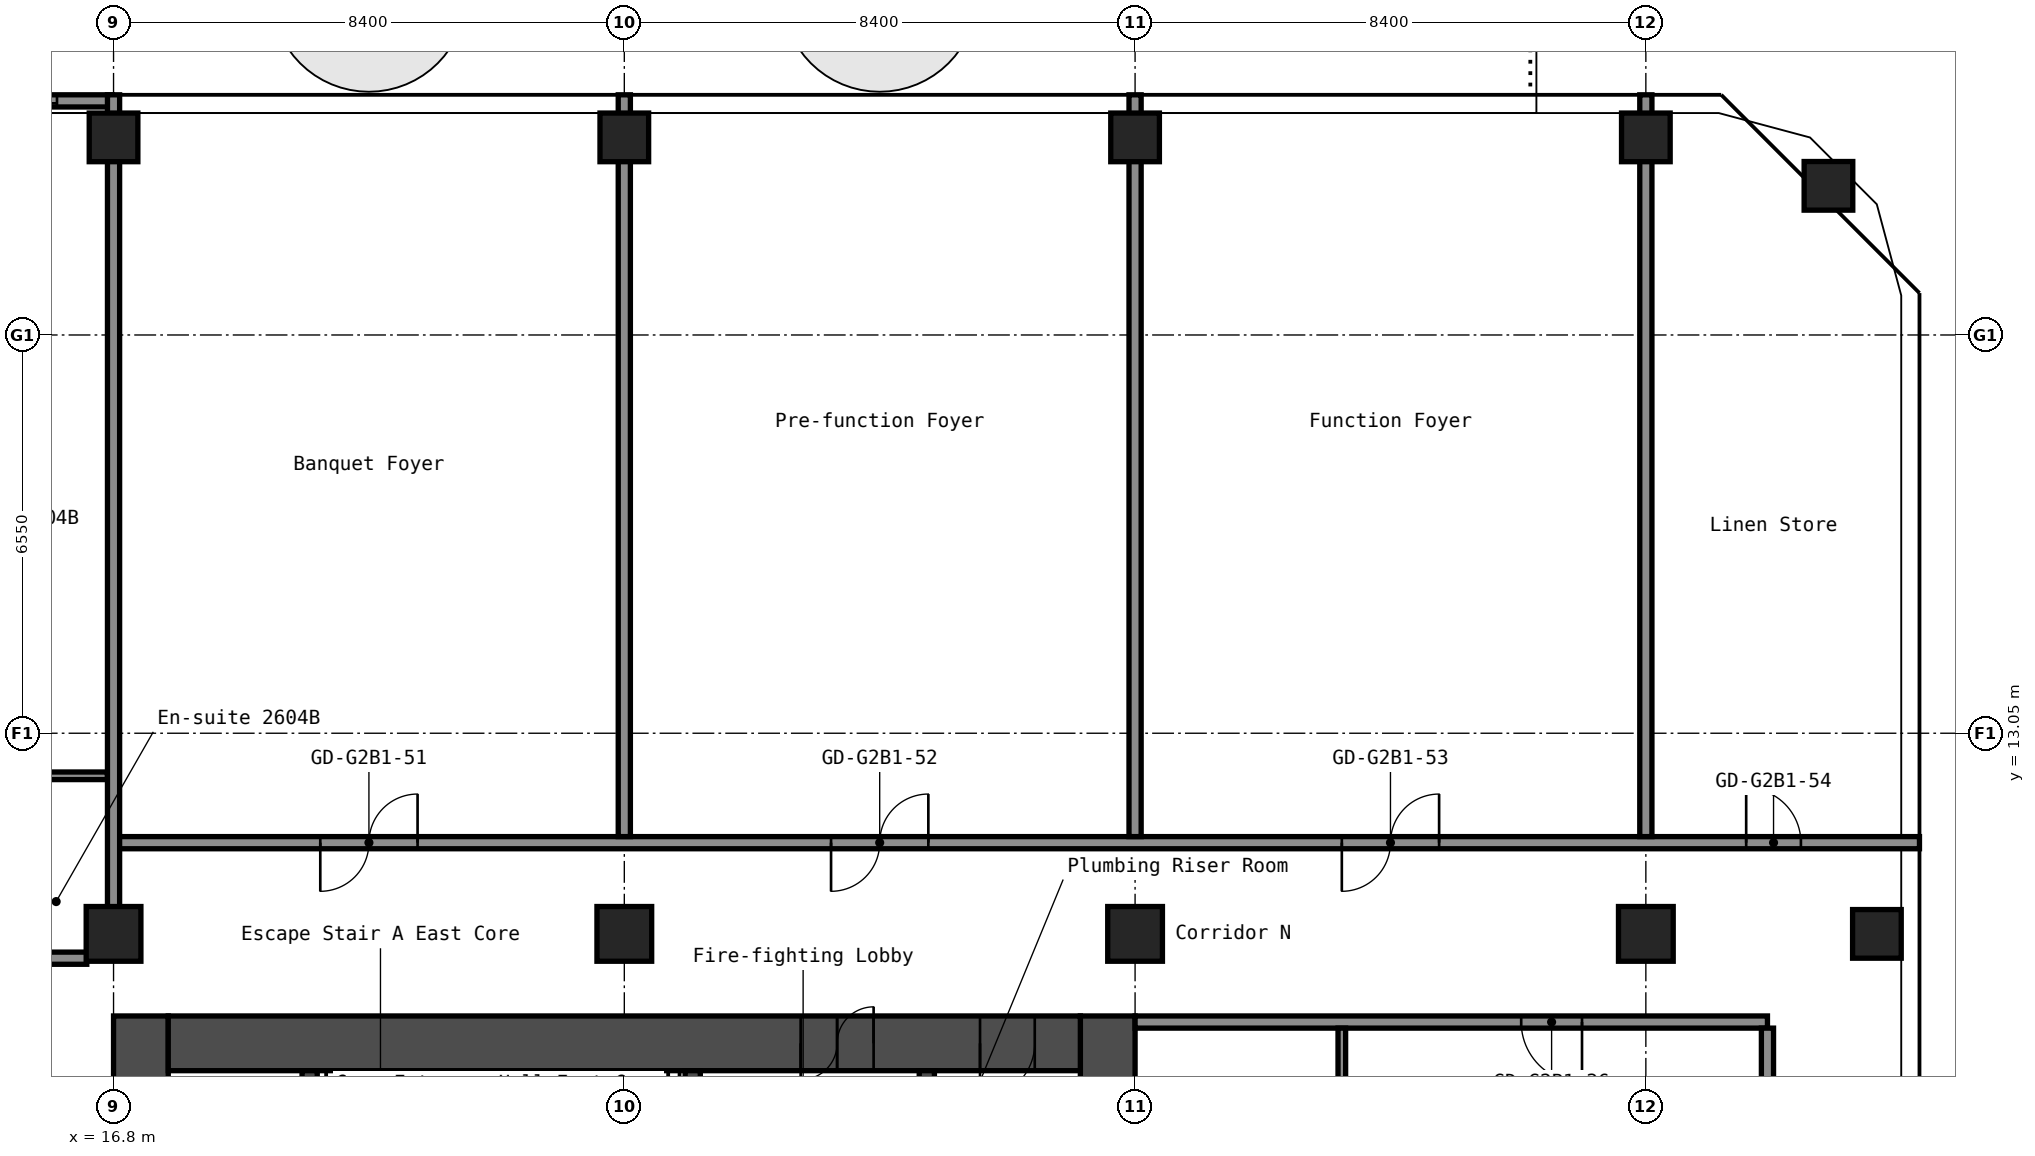
"""IFC4 building model, lengths in metres.
Left out: names, types, materials, properties, quantities, classifications, styles, units other than length and angle.
Written with IfcOpenShell. Run it as: python <this file> out.ifc"""

import sys

from ifc_helpers import new_model, si_unit, direction, frame, frame_2d, origin, origin_2d, place, context, subcontext, project, spatial, rectangle, hollow_rectangle, extrude, element, fill, save


model = new_model("IFC4")
c1 = context("Model", 3, precision=1e-05, world=origin(), true_north=direction((0.0, 1.0)))
c2 = subcontext(c1, "Body", "Model", "MODEL_VIEW")
j1 = project(units=[si_unit("LENGTHUNIT", "METRE"), si_unit("PLANEANGLEUNIT", "RADIAN")], contexts=[c1])
p1 = place(None, origin())
s1 = spatial("IfcSite", under=j1, at=p1, CompositionType="ELEMENT")
p2 = place(p1, origin())
s2 = spatial("IfcBuilding", under=s1, at=p2, CompositionType="ELEMENT")
p3 = place(p2, frame((0.0, 0.0, 94.6)))
s3 = spatial("IfcBuildingStorey", under=s2, at=p3, CompositionType="ELEMENT", Elevation=94.6)
p4 = place(p3, frame((16.8, 9.75, 0.0), z_axis=(0.0, 0.0, 1.0), x_axis=(1.0, 0.0, 0.0)))
e1 = element("IfcColumn", 1, at=p4, inside=s3, PredefinedType="COLUMN", context=c2, shape_type="SweptSolid", body=[
    extrude(hollow_rectangle(XDim=0.9, YDim=0.9, WallThickness=0.036, at=origin_2d()), origin(), (0.0, 0.0, 1.0), 2.8),
])
p5 = place(p3, frame((16.8, 22.85, 0.0), z_axis=(0.0, 0.0, 1.0), x_axis=(1.0, 0.0, 0.0)))
e2 = element("IfcColumn", 2, at=p5, inside=s3, PredefinedType="COLUMN", context=c2, shape_type="SweptSolid", body=[
    extrude(hollow_rectangle(XDim=0.8, YDim=0.8, WallThickness=0.032, at=origin_2d()), origin(), (0.0, 0.0, 1.0), 2.8),
])
p6 = place(p3, frame((25.2, 9.75, 0.0), z_axis=(0.0, 0.0, 1.0), x_axis=(1.0, 0.0, 0.0)))
e3 = element("IfcColumn", 3, at=p6, inside=s3, PredefinedType="COLUMN", context=c2, shape_type="SweptSolid", body=[
    extrude(hollow_rectangle(XDim=0.9, YDim=0.9, WallThickness=0.036, at=origin_2d()), origin(), (0.0, 0.0, 1.0), 2.8),
])
p7 = place(p3, frame((25.2, 22.85, 0.0), z_axis=(0.0, 0.0, 1.0), x_axis=(1.0, 0.0, 0.0)))
e4 = element("IfcColumn", 4, at=p7, inside=s3, PredefinedType="COLUMN", context=c2, shape_type="SweptSolid", body=[
    extrude(hollow_rectangle(XDim=0.8, YDim=0.8, WallThickness=0.032, at=origin_2d()), origin(), (0.0, 0.0, 1.0), 2.8),
])
p8 = place(p3, frame((33.6, 9.75, 0.0), z_axis=(0.0, 0.0, 1.0), x_axis=(1.0, 0.0, 0.0)))
e5 = element("IfcColumn", 5, at=p8, inside=s3, PredefinedType="COLUMN", context=c2, shape_type="SweptSolid", body=[
    extrude(hollow_rectangle(XDim=0.9, YDim=0.9, WallThickness=0.036, at=origin_2d()), origin(), (0.0, 0.0, 1.0), 2.8),
])
p9 = place(p3, frame((33.6, 22.85, 0.0), z_axis=(0.0, 0.0, 1.0), x_axis=(1.0, 0.0, 0.0)))
e6 = element("IfcColumn", 6, at=p9, inside=s3, PredefinedType="COLUMN", context=c2, shape_type="SweptSolid", body=[
    extrude(hollow_rectangle(XDim=0.8, YDim=0.8, WallThickness=0.032, at=origin_2d()), origin(), (0.0, 0.0, 1.0), 2.8),
])
p10 = place(p3, frame((42.0, 9.75, 0.0), z_axis=(0.0, 0.0, 1.0), x_axis=(1.0, 0.0, 0.0)))
e7 = element("IfcColumn", 7, at=p10, inside=s3, PredefinedType="COLUMN", context=c2, shape_type="SweptSolid", body=[
    extrude(hollow_rectangle(XDim=0.9, YDim=0.9, WallThickness=0.036, at=origin_2d()), origin(), (0.0, 0.0, 1.0), 2.8),
])
for number, where, z_axis, x_axis in (
    (8, (42.0, 22.85, 0.0), (0.0, 0.0, 1.0), (1.0, 0.0, 0.0)),
    (9, (45.8, 9.75, 0.0), (0.0, 0.0, 1.0), (1.0, 0.0, 0.0)),
    (10, (45.003, 22.053, 0.0), (0.0, 0.0, 1.0), (1.0, 0.0, 0.0)),
):
    element("IfcColumn", number, at=place(p3, frame(where, z_axis=z_axis, x_axis=x_axis)), inside=s3, PredefinedType="COLUMN", context=c2, shape_type="SweptSolid", body=[
        extrude(hollow_rectangle(XDim=0.8, YDim=0.8, WallThickness=0.032, at=origin_2d()), origin(), (0.0, 0.0, 1.0), 2.8),
    ])
p11 = place(p3, frame((17.25, -8.4, 0.0), z_axis=(0.0, 0.0, 1.0), x_axis=(0.0, 1.0, 0.0)))
e11 = element("IfcWall", 11, at=p11, inside=s3, PredefinedType="SHEAR", context=c2, shape_type="SweptSolid", body=[
    extrude(rectangle(XDim=16.8, YDim=0.9, at=frame_2d((8.4, 0.0))), origin(), (0.0, 0.0, 1.0), 2.8),
])
p12 = place(p11, frame((7.6, 0.0, 0.0)))
e12 = element("IfcOpeningElement", 12, at=p12, cuts=e11, PredefinedType="OPENING", context=c2, shape_type="SweptSolid", body=[
    extrude(rectangle(XDim=1.2, YDim=2.1, at=frame_2d((0.6, 1.05))), frame((0.0, 0.46, 0.0), z_axis=(0.0, -1.0, 0.0), x_axis=(1.0, 0.0, 0.0)), (0.0, 0.0, 1.0), 0.92),
])
p13 = place(p3, frame((33.15, -8.4, 0.0), z_axis=(0.0, 0.0, 1.0), x_axis=(0.0, 1.0, 0.0)))
e13 = element("IfcWall", 13, at=p13, inside=s3, PredefinedType="SHEAR", context=c2, shape_type="SweptSolid", body=[
    extrude(rectangle(XDim=16.8, YDim=0.9, at=frame_2d((8.4, 0.0))), origin(), (0.0, 0.0, 1.0), 2.8),
])
p14 = place(p3, frame((17.7, 7.95, 0.0), z_axis=(0.0, 0.0, 1.0), x_axis=(1.0, 0.0, 0.0)))
e14 = element("IfcWall", 14, at=p14, inside=s3, PredefinedType="SHEAR", context=c2, shape_type="SweptSolid", body=[
    extrude(rectangle(XDim=15.0, YDim=0.9, at=frame_2d((7.5, 0.0))), origin(), (0.0, 0.0, 1.0), 2.8),
])
p15 = place(p14, frame((10.4, 0.0, 0.0)))
e15 = element("IfcOpeningElement", 15, at=p15, cuts=e14, PredefinedType="OPENING", context=c2, shape_type="SweptSolid", body=[
    extrude(rectangle(XDim=1.2, YDim=2.1, at=frame_2d((0.6, 1.05))), frame((0.0, 0.46, 0.0), z_axis=(0.0, -1.0, 0.0), x_axis=(1.0, 0.0, 0.0)), (0.0, 0.0, 1.0), 0.92),
])
p16 = place(p14, frame((13.35, 0.0, 0.0)))
e16 = element("IfcOpeningElement", 16, at=p16, cuts=e14, PredefinedType="OPENING", context=c2, shape_type="SweptSolid", body=[
    extrude(rectangle(XDim=0.9, YDim=2.1, at=frame_2d((0.45, 1.05))), frame((0.0, 0.46, 0.0), z_axis=(0.0, -1.0, 0.0), x_axis=(1.0, 0.0, 0.0)), (0.0, 0.0, 1.0), 0.92),
])
p17 = place(p3, frame((20.025, 1.2, 0.0), z_axis=(0.0, 0.0, 1.0), x_axis=(0.0, 1.0, 0.0)))
e17 = element("IfcWall", 17, at=p17, inside=s3, PredefinedType="SHEAR", context=c2, shape_type="SweptSolid", body=[
    extrude(rectangle(XDim=6.3, YDim=0.25, at=frame_2d((3.15, 0.0))), origin(), (0.0, 0.0, 1.0), 2.8),
])
p18 = place(p3, frame((26.325, 3.75, 0.0), z_axis=(0.0, 0.0, 1.0), x_axis=(0.0, 1.0, 0.0)))
e18 = element("IfcWall", 18, at=p18, inside=s3, PredefinedType="SHEAR", context=c2, shape_type="SweptSolid", body=[
    extrude(rectangle(XDim=3.75, YDim=0.25, at=frame_2d((1.875, 0.0))), origin(), (0.0, 0.0, 1.0), 2.8),
])
p19 = place(p18, frame((1.25, 0.0, 0.0)))
e19 = element("IfcOpeningElement", 19, at=p19, cuts=e18, PredefinedType="OPENING", context=c2, shape_type="SweptSolid", body=[
    extrude(rectangle(XDim=1.2, YDim=2.1, at=frame_2d((0.6, 1.05))), frame((0.0, 0.135, 0.0), z_axis=(0.0, -1.0, 0.0), x_axis=(1.0, 0.0, 0.0)), (0.0, 0.0, 1.0), 0.27),
])
p20 = place(p3, frame((30.175, 1.45, 0.0), z_axis=(0.0, 0.0, 1.0), x_axis=(0.0, 1.0, 0.0)))
e20 = element("IfcWall", 20, at=p20, inside=s3, PredefinedType="SHEAR", context=c2, shape_type="SweptSolid", body=[
    extrude(rectangle(XDim=6.05, YDim=0.25, at=frame_2d((3.025, 0.0))), origin(), (0.0, 0.0, 1.0), 2.8),
])
p21 = place(p20, frame((2.625, 0.0, 0.0)))
e21 = element("IfcOpeningElement", 21, at=p21, cuts=e20, PredefinedType="OPENING", context=c2, shape_type="SweptSolid", body=[
    extrude(rectangle(XDim=1.1, YDim=2.1, at=frame_2d((0.55, 1.05))), frame((0.0, 0.135, 0.0), z_axis=(0.0, -1.0, 0.0), x_axis=(1.0, 0.0, 0.0)), (0.0, 0.0, 1.0), 0.27),
])
p22 = place(p3, frame((33.6, 8.3, 0.0), z_axis=(0.0, 0.0, 1.0), x_axis=(1.0, 0.0, 0.0)))
e22 = element("IfcWall", 22, at=p22, inside=s3, PredefinedType="PARTITIONING", context=c2, shape_type="SweptSolid", body=[
    extrude(rectangle(XDim=10.4, YDim=0.2, at=frame_2d((5.2, 0.0))), origin(), (0.0, 0.0, 1.0), 2.8),
])
p23 = place(p22, frame((6.35, 0.0, 0.0)))
e23 = element("IfcOpeningElement", 23, at=p23, cuts=e22, PredefinedType="OPENING", context=c2, shape_type="SweptSolid", body=[
    extrude(rectangle(XDim=1.0, YDim=2.1, at=frame_2d((0.5, 1.05))), frame((0.0, 0.11, 0.0), z_axis=(0.0, -1.0, 0.0), x_axis=(1.0, 0.0, 0.0)), (0.0, 0.0, 1.0), 0.22),
])
p24 = place(p3, frame((-16.36, 9.35, 0.0), z_axis=(0.0, 0.0, 1.0), x_axis=(1.0, 0.0, 0.0)))
e24 = element("IfcWall", 24, at=p24, inside=s3, PredefinedType="PARTITIONING", context=c2, shape_type="SweptSolid", body=[
    extrude(rectangle(XDim=32.72, YDim=0.2, at=frame_2d((16.36, 0.0))), origin(), (0.0, 0.0, 1.0), 2.8),
])
p25 = place(p24, frame((1.8, 0.0, 0.0)))
e25 = element("IfcOpeningElement", 25, at=p25, cuts=e24, PredefinedType="OPENING", context=c2, shape_type="SweptSolid", body=[
    extrude(rectangle(XDim=0.9, YDim=2.1, at=frame_2d((0.45, 1.05))), frame((0.0, 0.11, 0.0), z_axis=(0.0, -1.0, 0.0), x_axis=(1.0, 0.0, 0.0)), (0.0, 0.0, 1.0), 0.22),
])
p26 = place(p24, frame((6.0, 0.0, 0.0)))
e26 = element("IfcOpeningElement", 26, at=p26, cuts=e24, PredefinedType="OPENING", context=c2, shape_type="SweptSolid", body=[
    extrude(rectangle(XDim=0.9, YDim=2.1, at=frame_2d((0.45, 1.05))), frame((0.0, 0.11, 0.0), z_axis=(0.0, -1.0, 0.0), x_axis=(1.0, 0.0, 0.0)), (0.0, 0.0, 1.0), 0.22),
])
p27 = place(p24, frame((9.275, 0.0, 0.0)))
e27 = element("IfcOpeningElement", 27, at=p27, cuts=e24, PredefinedType="OPENING", context=c2, shape_type="SweptSolid", body=[
    extrude(rectangle(XDim=0.9, YDim=2.1, at=frame_2d((0.45, 1.05))), frame((0.0, 0.11, 0.0), z_axis=(0.0, -1.0, 0.0), x_axis=(1.0, 0.0, 0.0)), (0.0, 0.0, 1.0), 0.22),
])
p28 = place(p24, frame((13.475, 0.0, 0.0)))
e28 = element("IfcOpeningElement", 28, at=p28, cuts=e24, PredefinedType="OPENING", context=c2, shape_type="SweptSolid", body=[
    extrude(rectangle(XDim=0.9, YDim=2.1, at=frame_2d((0.45, 1.05))), frame((0.0, 0.11, 0.0), z_axis=(0.0, -1.0, 0.0), x_axis=(1.0, 0.0, 0.0)), (0.0, 0.0, 1.0), 0.22),
])
p29 = place(p24, frame((19.21, 0.0, 0.0)))
e29 = element("IfcOpeningElement", 29, at=p29, cuts=e24, PredefinedType="OPENING", context=c2, shape_type="SweptSolid", body=[
    extrude(rectangle(XDim=1.0, YDim=2.1, at=frame_2d((0.5, 1.05))), frame((0.0, 0.11, 0.0), z_axis=(0.0, -1.0, 0.0), x_axis=(1.0, 0.0, 0.0)), (0.0, 0.0, 1.0), 0.22),
])
p30 = place(p24, frame((20.91, 0.0, 0.0)))
e30 = element("IfcOpeningElement", 30, at=p30, cuts=e24, PredefinedType="OPENING", context=c2, shape_type="SweptSolid", body=[
    extrude(rectangle(XDim=1.0, YDim=2.1, at=frame_2d((0.5, 1.05))), frame((0.0, 0.11, 0.0), z_axis=(0.0, -1.0, 0.0), x_axis=(1.0, 0.0, 0.0)), (0.0, 0.0, 1.0), 0.22),
])
p31 = place(p24, frame((27.61, 0.0, 0.0)))
e31 = element("IfcOpeningElement", 31, at=p31, cuts=e24, PredefinedType="OPENING", context=c2, shape_type="SweptSolid", body=[
    extrude(rectangle(XDim=1.0, YDim=2.1, at=frame_2d((0.5, 1.05))), frame((0.0, 0.11, 0.0), z_axis=(0.0, -1.0, 0.0), x_axis=(1.0, 0.0, 0.0)), (0.0, 0.0, 1.0), 0.22),
])
p32 = place(p24, frame((29.31, 0.0, 0.0)))
e32 = element("IfcOpeningElement", 32, at=p32, cuts=e24, PredefinedType="OPENING", context=c2, shape_type="SweptSolid", body=[
    extrude(rectangle(XDim=1.0, YDim=2.1, at=frame_2d((0.5, 1.05))), frame((0.0, 0.11, 0.0), z_axis=(0.0, -1.0, 0.0), x_axis=(1.0, 0.0, 0.0)), (0.0, 0.0, 1.0), 0.22),
])
p33 = place(p3, frame((16.8, 11.25, 0.0), z_axis=(0.0, 0.0, 1.0), x_axis=(1.0, 0.0, 0.0)))
e33 = element("IfcWall", 33, at=p33, inside=s3, PredefinedType="PARTITIONING", context=c2, shape_type="SweptSolid", body=[
    extrude(rectangle(XDim=29.7, YDim=0.2, at=frame_2d((14.85, 0.0))), origin(), (0.0, 0.0, 1.0), 2.8),
])
p34 = place(p33, frame((3.4, 0.0, 0.0)))
e34 = element("IfcOpeningElement", 34, at=p34, cuts=e33, PredefinedType="OPENING", context=c2, shape_type="SweptSolid", body=[
    extrude(rectangle(XDim=1.6, YDim=2.1, at=frame_2d((0.8, 1.05))), frame((0.0, 0.11, 0.0), z_axis=(0.0, -1.0, 0.0), x_axis=(1.0, 0.0, 0.0)), (0.0, 0.0, 1.0), 0.22),
])
p35 = place(p33, frame((11.8, 0.0, 0.0)))
e35 = element("IfcOpeningElement", 35, at=p35, cuts=e33, PredefinedType="OPENING", context=c2, shape_type="SweptSolid", body=[
    extrude(rectangle(XDim=1.6, YDim=2.1, at=frame_2d((0.8, 1.05))), frame((0.0, 0.11, 0.0), z_axis=(0.0, -1.0, 0.0), x_axis=(1.0, 0.0, 0.0)), (0.0, 0.0, 1.0), 0.22),
])
p36 = place(p33, frame((20.2, 0.0, 0.0)))
e36 = element("IfcOpeningElement", 36, at=p36, cuts=e33, PredefinedType="OPENING", context=c2, shape_type="SweptSolid", body=[
    extrude(rectangle(XDim=1.6, YDim=2.1, at=frame_2d((0.8, 1.05))), frame((0.0, 0.11, 0.0), z_axis=(0.0, -1.0, 0.0), x_axis=(1.0, 0.0, 0.0)), (0.0, 0.0, 1.0), 0.22),
])
p37 = place(p33, frame((26.85, 0.0, 0.0)))
e37 = element("IfcOpeningElement", 37, at=p37, cuts=e33, PredefinedType="OPENING", context=c2, shape_type="SweptSolid", body=[
    extrude(rectangle(XDim=0.9, YDim=2.1, at=frame_2d((0.45, 1.05))), frame((0.0, 0.11, 0.0), z_axis=(0.0, -1.0, 0.0), x_axis=(1.0, 0.0, 0.0)), (0.0, 0.0, 1.0), 0.22),
])
p38 = place(p3, frame((14.363, 12.35, 0.0), z_axis=(0.0, 0.0, 1.0), x_axis=(1.0, 0.0, 0.0)))
e38 = element("IfcWall", 38, at=p38, inside=s3, PredefinedType="PARTITIONING", context=c2, shape_type="SweptSolid", body=[
    extrude(rectangle(XDim=2.337, YDim=0.125, at=frame_2d((1.169, 0.0))), origin(), (0.0, 0.0, 1.0), 2.8),
])
p39 = place(p3, frame((16.8, 10.19, 0.0), z_axis=(0.0, 0.0, 1.0), x_axis=(0.0, 1.0, 0.0)))
e39 = element("IfcWall", 39, at=p39, inside=s3, PredefinedType="PARTITIONING", context=c2, shape_type="SweptSolid", body=[
    extrude(rectangle(XDim=13.36, YDim=0.2, at=frame_2d((6.68, 0.0))), origin(), (0.0, 0.0, 1.0), 2.8),
])
for number, where, z_axis, x_axis in (
    (40, (25.2, 11.35, 0.0), (0.0, 0.0, 1.0), (0.0, 1.0, 0.0)),
    (41, (33.6, 11.35, 0.0), (0.0, 0.0, 1.0), (0.0, 1.0, 0.0)),
):
    element("IfcWall", number, at=place(p3, frame(where, z_axis=z_axis, x_axis=x_axis)), inside=s3, PredefinedType="PARTITIONING", context=c2, shape_type="SweptSolid", body=[
        extrude(rectangle(XDim=12.2, YDim=0.2, at=frame_2d((6.1, 0.0))), origin(), (0.0, 0.0, 1.0), 2.8),
    ])
p40 = place(p3, frame((37.0, 4.9, 0.0), z_axis=(0.0, 0.0, 1.0), x_axis=(0.0, 1.0, 0.0)))
e42 = element("IfcWall", 42, at=p40, inside=s3, PredefinedType="PARTITIONING", context=c2, shape_type="SweptSolid", body=[
    extrude(rectangle(XDim=3.3, YDim=0.125, at=frame_2d((1.65, 0.0))), origin(), (0.0, 0.0, 1.0), 2.8),
])
p41 = place(p3, frame((42.0, 11.35, 0.0), z_axis=(0.0, 0.0, 1.0), x_axis=(0.0, 1.0, 0.0)))
e43 = element("IfcWall", 43, at=p41, inside=s3, PredefinedType="PARTITIONING", context=c2, shape_type="SweptSolid", body=[
    extrude(rectangle(XDim=12.2, YDim=0.2, at=frame_2d((6.1, 0.0))), origin(), (0.0, 0.0, 1.0), 2.8),
])
p42 = place(p3, frame((44.0, -8.2, 0.0), z_axis=(0.0, 0.0, 1.0), x_axis=(0.0, 1.0, 0.0)))
e44 = element("IfcWall", 44, at=p42, inside=s3, PredefinedType="PARTITIONING", context=c2, shape_type="SweptSolid", body=[
    extrude(rectangle(XDim=16.4, YDim=0.2, at=frame_2d((8.2, 0.0))), origin(), (0.0, 0.0, 1.0), 2.8),
])
p43 = place(p3, frame((16.78, 23.45, 0.0), z_axis=(0.0, 0.0, 1.0), x_axis=(-1.0, 0.0, 0.0)))
p44 = place(p43, frame((0.91, 0.0, 0.0)))
p45 = place(p44, frame((2.4, 0.0, 0.0), z_axis=(0.0, 0.0, 1.0), x_axis=(-1.0, 0.0, 0.0)))
e45 = element("IfcDoor", 45, at=p45, inside=s3, OperationType="SLIDING_TO_LEFT", PredefinedType="DOOR", context=c2, shape_type="SweptSolid", body=[
    extrude(rectangle(XDim=2.4, YDim=2.2, at=frame_2d((1.2, 1.1))), frame((0.0, 0.025, 0.0), z_axis=(0.0, -1.0, 0.0), x_axis=(1.0, 0.0, 0.0)), (0.0, 0.0, 1.0), 0.05),
])
p46 = place(p15, origin())
e46 = element("IfcDoor", 46, at=p46, inside=s3, OperationType="DOUBLE_DOOR_SINGLE_SWING", PredefinedType="DOOR", context=c2, shape_type="SweptSolid", body=[
    extrude(rectangle(XDim=1.2, YDim=2.1, at=frame_2d((0.6, 1.05))), frame((0.0, 0.025, 0.0), z_axis=(0.0, -1.0, 0.0), x_axis=(1.0, 0.0, 0.0)), (0.0, 0.0, 1.0), 0.05),
])
fill(e15, e46)
p47 = place(p16, origin())
e47 = element("IfcDoor", 47, at=p47, inside=s3, OperationType="SINGLE_SWING_LEFT", PredefinedType="DOOR", context=c2, shape_type="SweptSolid", body=[
    extrude(rectangle(XDim=0.9, YDim=2.1, at=frame_2d((0.45, 1.05))), frame((0.0, 0.025, 0.0), z_axis=(0.0, -1.0, 0.0), x_axis=(1.0, 0.0, 0.0)), (0.0, 0.0, 1.0), 0.05),
])
fill(e16, e47)
p48 = place(p23, origin())
e48 = element("IfcDoor", 48, at=p48, inside=s3, OperationType="SINGLE_SWING_RIGHT", PredefinedType="DOOR", context=c2, shape_type="SweptSolid", body=[
    extrude(rectangle(XDim=1.0, YDim=2.1, at=frame_2d((0.5, 1.05))), frame((0.0, 0.025, 0.0), z_axis=(0.0, -1.0, 0.0), x_axis=(1.0, 0.0, 0.0)), (0.0, 0.0, 1.0), 0.05),
])
fill(e23, e48)
p49 = place(p34, origin())
e49 = element("IfcDoor", 49, at=p49, inside=s3, OperationType="DOUBLE_DOOR_SINGLE_SWING", PredefinedType="DOOR", context=c2, shape_type="SweptSolid", body=[
    extrude(rectangle(XDim=1.6, YDim=2.1, at=frame_2d((0.8, 1.05))), frame((0.0, 0.025, 0.0), z_axis=(0.0, -1.0, 0.0), x_axis=(1.0, 0.0, 0.0)), (0.0, 0.0, 1.0), 0.05),
])
fill(e34, e49)
p50 = place(p35, origin())
e50 = element("IfcDoor", 50, at=p50, inside=s3, OperationType="DOUBLE_DOOR_SINGLE_SWING", PredefinedType="DOOR", context=c2, shape_type="SweptSolid", body=[
    extrude(rectangle(XDim=1.6, YDim=2.1, at=frame_2d((0.8, 1.05))), frame((0.0, 0.025, 0.0), z_axis=(0.0, -1.0, 0.0), x_axis=(1.0, 0.0, 0.0)), (0.0, 0.0, 1.0), 0.05),
])
fill(e35, e50)
p51 = place(p36, origin())
e51 = element("IfcDoor", 51, at=p51, inside=s3, OperationType="DOUBLE_DOOR_SINGLE_SWING", PredefinedType="DOOR", context=c2, shape_type="SweptSolid", body=[
    extrude(rectangle(XDim=1.6, YDim=2.1, at=frame_2d((0.8, 1.05))), frame((0.0, 0.025, 0.0), z_axis=(0.0, -1.0, 0.0), x_axis=(1.0, 0.0, 0.0)), (0.0, 0.0, 1.0), 0.05),
])
fill(e36, e51)
p52 = place(p37, origin())
e52 = element("IfcDoor", 52, at=p52, inside=s3, OperationType="SINGLE_SWING_RIGHT", PredefinedType="DOOR", context=c2, shape_type="SweptSolid", body=[
    extrude(rectangle(XDim=0.9, YDim=2.1, at=frame_2d((0.45, 1.05))), frame((0.0, 0.025, 0.0), z_axis=(0.0, -1.0, 0.0), x_axis=(1.0, 0.0, 0.0)), (0.0, 0.0, 1.0), 0.05),
])
fill(e37, e52)
save(model, sys.argv[1])
